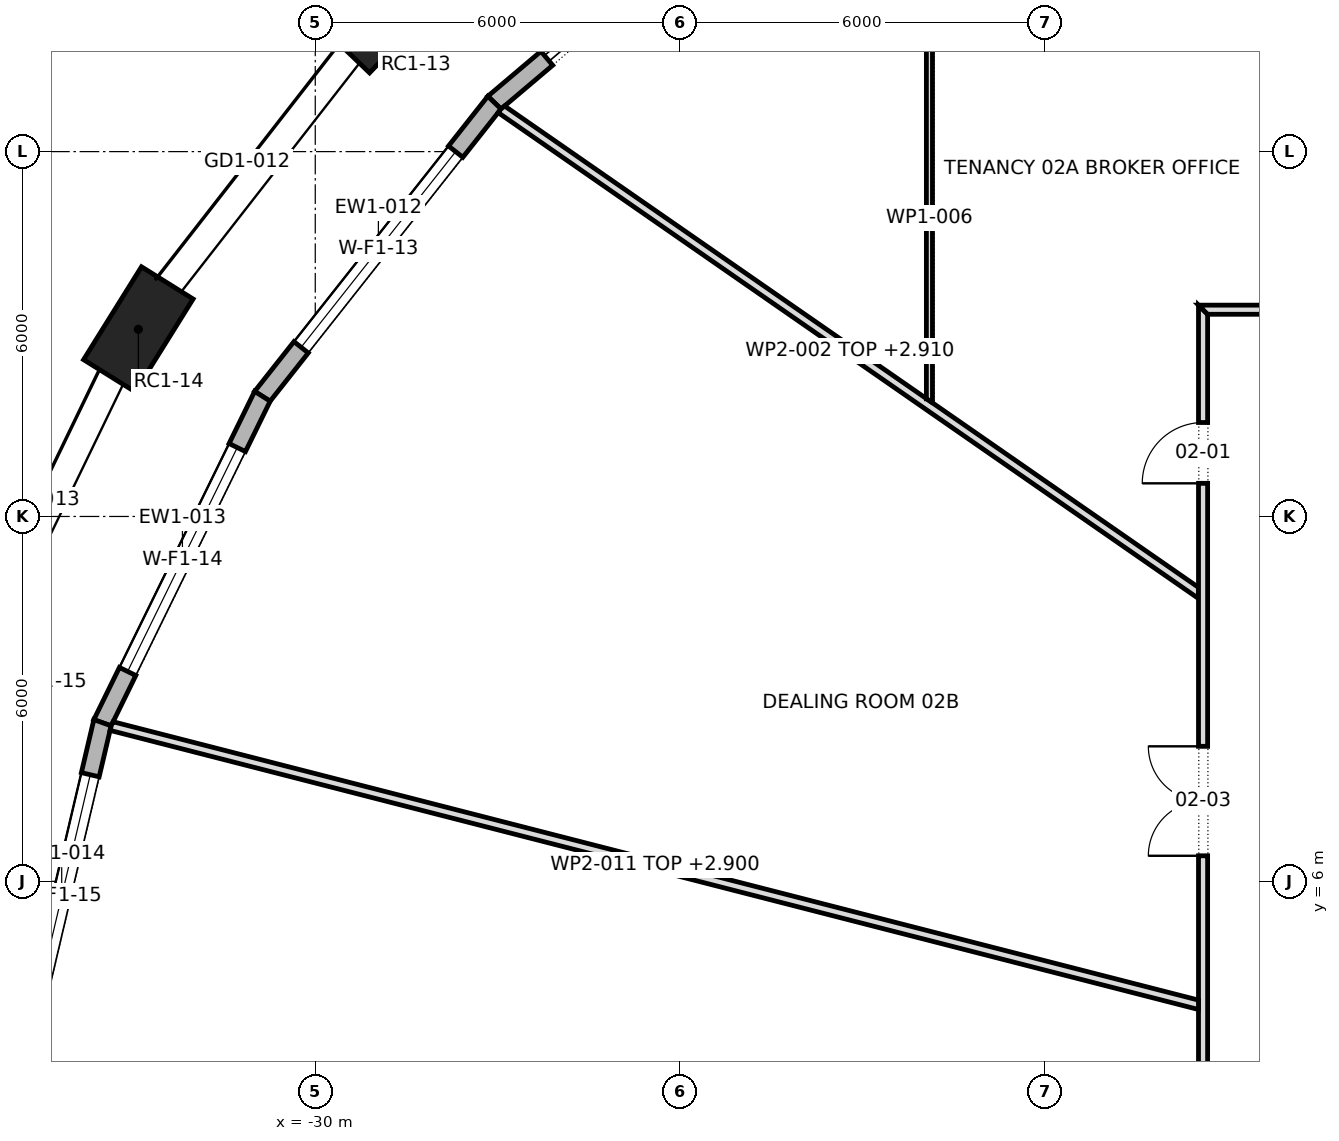
"""IFC4 building model, lengths in metres.
Left out: names, types, materials, properties, quantities, classifications, styles, units other than length and angle.
Written with IfcOpenShell. Run it as: python <this file> out.ifc"""

import sys

from ifc_helpers import new_model, si_unit, direction, frame, frame_2d, origin, origin_2d, place, context, subcontext, project, spatial, polyline, rectangle, outline, extrude, element, fill, save


model = new_model("IFC4")
c1 = context("Model", 3, precision=1e-05, world=origin(), true_north=direction((0.0, 1.0)))
c2 = subcontext(c1, "Body", "Model", "MODEL_VIEW")
j1 = project(units=[si_unit("LENGTHUNIT", "METRE"), si_unit("PLANEANGLEUNIT", "RADIAN")], contexts=[c1])
p1 = place(None, origin())
s1 = spatial("IfcSite", under=j1, at=p1, CompositionType="ELEMENT")
p2 = place(p1, origin())
s2 = spatial("IfcBuilding", under=s1, at=p2, CompositionType="ELEMENT")
p3 = place(p2, frame((0.0, 0.0, 44.5)))
s3 = spatial("IfcBuildingStorey", under=s2, at=p3, CompositionType="ELEMENT", Elevation=44.5)
for number, where, z_axis, x_axis in (
    (1, (-28.845, 20.291, 0.0), (0.0, 0.0, 1.0), (-0.692, -0.722, 0.0)),
    (2, (-32.91, 15.078, 0.0), (0.0, 0.0, 1.0), (-0.529, -0.849, 0.0)),
):
    element("IfcColumn", number, at=place(p3, frame(where, z_axis=z_axis, x_axis=x_axis)), inside=s3, PredefinedType="COLUMN", context=c2, shape_type="SweptSolid", body=[
        extrude(rectangle(XDim=1.8, YDim=1.0, at=origin_2d()), origin(), (0.0, 0.0, 1.0), 4.2),
    ])
p4 = place(p3, frame((-22.2, 22.911, 0.0), z_axis=(0.0, 0.0, 1.0), x_axis=(-0.763577077796, -0.645716691951, 0.0)))
e3 = element("IfcWall", 3, at=p4, inside=s3, PredefinedType="STANDARD", context=c2, shape_type="SweptSolid", body=[
    extrude(outline(polyline([(-0.014, -0.15), (6.372, -0.15), (6.342, 0.15), (0.014, 0.15), (-0.014, -0.15)])), origin(), (0.0, 0.0, 1.0), 3.9),
])
p5 = place(p4, frame((1.129, 0.0, 0.0)))
e4 = element("IfcOpeningElement", 4, at=p5, cuts=e3, PredefinedType="OPENING", context=c2, shape_type="SweptSolid", body=[
    extrude(rectangle(XDim=4.1, YDim=3.45, at=frame_2d((2.05, 1.725))), frame((0.0, 0.162, 0.0), z_axis=(0.0, -1.0, 0.0), x_axis=(1.0, 0.0, 0.0)), (0.0, 0.0, 1.0), 0.324),
])
p6 = place(p3, frame((-27.054, 18.806, 0.0), z_axis=(0.0, 0.0, 1.0), x_axis=(-0.61992334328, -0.784662378642, 0.0)))
e5 = element("IfcWall", 5, at=p6, inside=s3, PredefinedType="STANDARD", context=c2, shape_type="SweptSolid", body=[
    extrude(outline(polyline([(-0.015, -0.15), (6.171, -0.15), (6.139, 0.15), (0.015, 0.15), (-0.015, -0.15)])), origin(), (0.0, 0.0, 1.0), 3.9),
])
p7 = place(p6, frame((1.027, 0.0, 0.6)))
e6 = element("IfcOpeningElement", 6, at=p7, cuts=e5, PredefinedType="OPENING", context=c2, shape_type="SweptSolid", body=[
    extrude(rectangle(XDim=4.1, YDim=2.85, at=frame_2d((2.05, 1.425))), frame((0.0, 0.162, 0.0), z_axis=(0.0, -1.0, 0.0), x_axis=(1.0, 0.0, 0.0)), (0.0, 0.0, 1.0), 0.324),
])
p8 = place(p3, frame((-30.869, 13.976, 0.0), z_axis=(0.0, 0.0, 1.0), x_axis=(-0.439896354052, -0.898048549741, 0.0)))
e7 = element("IfcWall", 7, at=p8, inside=s3, PredefinedType="STANDARD", context=c2, shape_type="SweptSolid", body=[
    extrude(outline(polyline([(-0.016, -0.15), (5.995, -0.15), (5.961, 0.15), (0.016, 0.15), (-0.016, -0.15)])), origin(), (0.0, 0.0, 1.0), 3.9),
])
p9 = place(p8, frame((0.939, 0.0, 0.6)))
e8 = element("IfcOpeningElement", 8, at=p9, cuts=e7, PredefinedType="OPENING", context=c2, shape_type="SweptSolid", body=[
    extrude(rectangle(XDim=4.1, YDim=2.85, at=frame_2d((2.05, 1.425))), frame((0.0, 0.162, 0.0), z_axis=(0.0, -1.0, 0.0), x_axis=(1.0, 0.0, 0.0)), (0.0, 0.0, 1.0), 0.324),
])
p10 = place(p3, frame((-33.499, 8.608, 0.0), z_axis=(0.0, 0.0, 1.0), x_axis=(-0.228976600496, -0.97343192696, 0.0)))
e9 = element("IfcWall", 9, at=p10, inside=s3, PredefinedType="STANDARD", context=c2, shape_type="SweptSolid", body=[
    extrude(outline(polyline([(-0.017, -0.15), (5.874, -0.15), (5.839, 0.15), (0.017, 0.15), (-0.017, -0.15)])), origin(), (0.0, 0.0, 1.0), 3.9),
])
p11 = place(p10, frame((0.878, 0.0, 0.6)))
e10 = element("IfcOpeningElement", 10, at=p11, cuts=e9, PredefinedType="OPENING", context=c2, shape_type="SweptSolid", body=[
    extrude(rectangle(XDim=4.1, YDim=2.85, at=frame_2d((2.05, 1.425))), frame((0.0, 0.162, 0.0), z_axis=(0.0, -1.0, 0.0), x_axis=(1.0, 0.0, 0.0)), (0.0, 0.0, 1.0), 0.324),
])
p12 = place(p3, frame((-26.949, 18.703, 0.0), z_axis=(0.0, 0.0, 1.0), x_axis=(0.821614916445, -0.570042918626, 0.0)))
e11 = element("IfcWall", 11, at=p12, inside=s3, PredefinedType="PARTITIONING", context=c2, shape_type="SweptSolid", body=[
    extrude(outline(polyline([(14.017, -0.075), (14.017, -0.074), (13.967, -0.002), (13.967, -0.002), (13.914, 0.075), (12.1, 0.075), (10.286, 0.075), (8.472, 0.075), (8.469, 0.073), (8.467, 0.075), (6.779, 0.075), (5.09, 0.075), (3.402, 0.075), (1.713, 0.075), (0.024, 0.075), (0.004, 0.0), (0.0, -0.071), (0.0, -0.075), (1.752, -0.075), (3.504, -0.075), (5.257, -0.075), (7.009, -0.075), (8.761, -0.075), (10.513, -0.075), (12.265, -0.075), (14.017, -0.075)])), origin(), (0.0, 0.0, 1.0), 2.91),
])
p13 = place(p3, frame((-19.9, 13.869, 0.0), z_axis=(0.0, 0.0, 1.0), x_axis=(0.0, 1.0, 0.0)))
e12 = element("IfcWall", 12, at=p13, inside=s3, PredefinedType="PARTITIONING", context=c2, shape_type="SweptSolid", body=[
    extrude(outline(polyline([(0.0, -0.05), (1.994, -0.05), (3.987, -0.05), (5.981, -0.05), (5.981, -0.05), (6.081, 0.05), (4.578, 0.05), (3.075, 0.05), (1.572, 0.05), (0.069, 0.05), (0.0, -0.05), (0.0, -0.05)])), origin(), (0.0, 0.0, 1.0), 3.9),
])
p14 = place(p3, frame((-15.4, -15.475, 0.0), z_axis=(0.0, 0.0, 1.0), x_axis=(0.0, 1.0, 0.0)))
e13 = element("IfcWall", 13, at=p14, inside=s3, PredefinedType="PARTITIONING", context=c2, shape_type="SweptSolid", body=[
    extrude(outline(polyline([(0.15, -0.075), (2.066, -0.075), (3.981, -0.075), (5.897, -0.075), (7.812, -0.075), (9.728, -0.075), (11.644, -0.075), (13.56, -0.075), (15.475, -0.075), (17.391, -0.075), (19.306, -0.075), (21.222, -0.075), (23.138, -0.075), (25.053, -0.075), (26.969, -0.075), (28.885, -0.075), (30.8, -0.075), (30.95, 0.075), (29.016, 0.075), (27.081, 0.075), (25.147, 0.075), (23.212, 0.075), (21.278, 0.075), (19.344, 0.075), (17.409, 0.075), (15.475, 0.075), (13.541, 0.075), (11.606, 0.075), (9.672, 0.075), (7.738, 0.075), (5.803, 0.075), (3.869, 0.075), (1.935, 0.075), (0.0, 0.075), (0.15, -0.075)])), origin(), (0.0, 0.0, 1.0), 3.9),
])
p15 = place(p14, frame((28.02, 0.0, 0.0)))
e14 = element("IfcOpeningElement", 14, at=p15, cuts=e13, PredefinedType="OPENING", context=c2, shape_type="SweptSolid", body=[
    extrude(rectangle(XDim=1.0, YDim=2.1, at=frame_2d((0.5, 1.05))), frame((0.0, 0.087, 0.0), z_axis=(0.0, -1.0, 0.0), x_axis=(1.0, 0.0, 0.0)), (0.0, 0.0, 1.0), 0.174),
])
p16 = place(p14, frame((21.895, 0.0, 0.0)))
e15 = element("IfcOpeningElement", 15, at=p16, cuts=e13, PredefinedType="OPENING", context=c2, shape_type="SweptSolid", body=[
    extrude(rectangle(XDim=1.8, YDim=2.1, at=frame_2d((0.9, 1.05))), frame((0.0, 0.087, 0.0), z_axis=(0.0, -1.0, 0.0), x_axis=(1.0, 0.0, 0.0)), (0.0, 0.0, 1.0), 0.174),
])
p17 = place(p14, frame((15.798, 0.0, 0.0)))
e16 = element("IfcOpeningElement", 16, at=p17, cuts=e13, PredefinedType="OPENING", context=c2, shape_type="SweptSolid", body=[
    extrude(rectangle(XDim=1.8, YDim=2.1, at=frame_2d((0.9, 1.05))), frame((0.0, 0.087, 0.0), z_axis=(0.0, -1.0, 0.0), x_axis=(1.0, 0.0, 0.0)), (0.0, 0.0, 1.0), 0.174),
])
p18 = place(p14, frame((10.343, 0.0, 0.0)))
e17 = element("IfcOpeningElement", 17, at=p18, cuts=e13, PredefinedType="OPENING", context=c2, shape_type="SweptSolid", body=[
    extrude(rectangle(XDim=1.8, YDim=2.1, at=frame_2d((0.9, 1.05))), frame((0.0, 0.087, 0.0), z_axis=(0.0, -1.0, 0.0), x_axis=(1.0, 0.0, 0.0)), (0.0, 0.0, 1.0), 0.174),
])
p19 = place(p14, frame((3.795, 0.0, 0.0)))
e18 = element("IfcOpeningElement", 18, at=p19, cuts=e13, PredefinedType="OPENING", context=c2, shape_type="SweptSolid", body=[
    extrude(rectangle(XDim=1.0, YDim=2.1, at=frame_2d((0.5, 1.05))), frame((0.0, 0.087, 0.0), z_axis=(0.0, -1.0, 0.0), x_axis=(1.0, 0.0, 0.0)), (0.0, 0.0, 1.0), 0.174),
])
p20 = place(p3, frame((-15.457, 3.965, 0.0), z_axis=(0.0, 0.0, 1.0), x_axis=(-0.968658160146, 0.248397602209, 0.0)))
e19 = element("IfcWall", 19, at=p20, inside=s3, PredefinedType="PARTITIONING", context=c2, shape_type="SweptSolid", body=[
    extrude(outline(polyline([(0.038, -0.075), (1.881, -0.075), (3.723, -0.075), (5.566, -0.075), (7.409, -0.075), (9.251, -0.075), (11.094, -0.075), (12.937, -0.075), (14.779, -0.075), (16.622, -0.075), (18.465, -0.075), (18.478, -0.012), (18.478, 0.075), (16.63, 0.075), (14.782, 0.075), (12.935, 0.075), (11.087, 0.075), (9.239, 0.075), (7.391, 0.075), (5.543, 0.075), (3.696, 0.075), (1.848, 0.075), (0.0, 0.075), (0.0, 0.073), (0.038, -0.075)])), origin(), (0.0, 0.0, 1.0), 2.9),
])
p21 = place(p3, frame((-15.475, 15.4, 0.0), z_axis=(0.0, 0.0, 1.0), x_axis=(1.0, 0.0, 0.0)))
e20 = element("IfcWall", 20, at=p21, inside=s3, PredefinedType="PARTITIONING", context=c2, shape_type="SweptSolid", body=[
    extrude(outline(polyline([(0.15, -0.075), (2.066, -0.075), (3.981, -0.075), (5.897, -0.075), (7.812, -0.075), (9.728, -0.075), (11.644, -0.075), (13.56, -0.075), (15.475, -0.075), (17.391, -0.075), (19.306, -0.075), (21.222, -0.075), (23.138, -0.075), (25.053, -0.075), (26.969, -0.075), (28.885, -0.075), (30.8, -0.075), (30.95, 0.075), (29.016, 0.075), (27.081, 0.075), (25.147, 0.075), (23.212, 0.075), (21.278, 0.075), (19.344, 0.075), (17.409, 0.075), (15.475, 0.075), (13.541, 0.075), (11.606, 0.075), (9.672, 0.075), (7.738, 0.075), (5.803, 0.075), (3.869, 0.075), (1.935, 0.075), (0.0, 0.075), (0.15, -0.075)])), origin(), (0.0, 0.0, 1.0), 3.9),
])
p22 = place(p21, frame((5.415, 0.0, 0.0)))
e21 = element("IfcOpeningElement", 21, at=p22, cuts=e20, PredefinedType="OPENING", context=c2, shape_type="SweptSolid", body=[
    extrude(rectangle(XDim=1.0, YDim=2.1, at=frame_2d((0.5, 1.05))), frame((0.0, 0.087, 0.0), z_axis=(0.0, -1.0, 0.0), x_axis=(1.0, 0.0, 0.0)), (0.0, 0.0, 1.0), 0.174),
])
p23 = place(p21, frame((25.435, 0.0, 0.0)))
e22 = element("IfcOpeningElement", 22, at=p23, cuts=e20, PredefinedType="OPENING", context=c2, shape_type="SweptSolid", body=[
    extrude(rectangle(XDim=1.0, YDim=2.1, at=frame_2d((0.5, 1.05))), frame((0.0, 0.087, 0.0), z_axis=(0.0, -1.0, 0.0), x_axis=(1.0, 0.0, 0.0)), (0.0, 0.0, 1.0), 0.174),
])
p24 = place(p21, frame((14.975, 0.0, 0.0)))
e23 = element("IfcOpeningElement", 23, at=p24, cuts=e20, PredefinedType="OPENING", context=c2, shape_type="SweptSolid", body=[
    extrude(rectangle(XDim=1.0, YDim=2.1, at=frame_2d((0.5, 1.05))), frame((0.0, 0.087, 0.0), z_axis=(0.0, -1.0, 0.0), x_axis=(1.0, 0.0, 0.0)), (0.0, 0.0, 1.0), 0.174),
])
p25 = place(p5, origin())
e24 = element("IfcDoor", 24, at=p25, inside=s3, OperationType="DOUBLE_DOOR_SLIDING", PredefinedType="DOOR", context=c2, shape_type="SweptSolid", body=[
    extrude(rectangle(XDim=4.1, YDim=3.45, at=frame_2d((2.05, 1.725))), frame((0.0, 0.025, 0.0), z_axis=(0.0, -1.0, 0.0), x_axis=(1.0, 0.0, 0.0)), (0.0, 0.0, 1.0), 0.05),
])
fill(e4, e24)
p26 = place(p7, origin())
e25 = element("IfcWindow", 25, at=p26, inside=s3, PartitioningType="TRIPLE_PANEL_VERTICAL", PredefinedType="WINDOW", context=c2, shape_type="SweptSolid", body=[
    extrude(rectangle(XDim=4.1, YDim=2.85, at=frame_2d((2.05, 1.425))), frame((0.0, 0.03, 0.0), z_axis=(0.0, -1.0, 0.0), x_axis=(1.0, 0.0, 0.0)), (0.0, 0.0, 1.0), 0.06),
])
fill(e6, e25)
p27 = place(p9, origin())
e26 = element("IfcWindow", 26, at=p27, inside=s3, PartitioningType="TRIPLE_PANEL_VERTICAL", PredefinedType="WINDOW", context=c2, shape_type="SweptSolid", body=[
    extrude(rectangle(XDim=4.1, YDim=2.85, at=frame_2d((2.05, 1.425))), frame((0.0, 0.03, 0.0), z_axis=(0.0, -1.0, 0.0), x_axis=(1.0, 0.0, 0.0)), (0.0, 0.0, 1.0), 0.06),
])
fill(e8, e26)
p28 = place(p11, origin())
e27 = element("IfcWindow", 27, at=p28, inside=s3, PartitioningType="TRIPLE_PANEL_VERTICAL", PredefinedType="WINDOW", context=c2, shape_type="SweptSolid", body=[
    extrude(rectangle(XDim=4.1, YDim=2.85, at=frame_2d((2.05, 1.425))), frame((0.0, 0.03, 0.0), z_axis=(0.0, -1.0, 0.0), x_axis=(1.0, 0.0, 0.0)), (0.0, 0.0, 1.0), 0.06),
])
fill(e10, e27)
p29 = place(p15, origin())
e28 = element("IfcDoor", 28, at=p29, inside=s3, OperationType="SINGLE_SWING_RIGHT", PredefinedType="DOOR", context=c2, shape_type="SweptSolid", body=[
    extrude(rectangle(XDim=1.0, YDim=2.1, at=frame_2d((0.5, 1.05))), frame((0.0, 0.025, 0.0), z_axis=(0.0, -1.0, 0.0), x_axis=(1.0, 0.0, 0.0)), (0.0, 0.0, 1.0), 0.05),
])
fill(e14, e28)
p30 = place(p16, origin())
e29 = element("IfcDoor", 29, at=p30, inside=s3, OperationType="DOUBLE_DOOR_SINGLE_SWING", PredefinedType="DOOR", context=c2, shape_type="SweptSolid", body=[
    extrude(rectangle(XDim=1.8, YDim=2.1, at=frame_2d((0.9, 1.05))), frame((0.0, 0.025, 0.0), z_axis=(0.0, -1.0, 0.0), x_axis=(1.0, 0.0, 0.0)), (0.0, 0.0, 1.0), 0.05),
])
fill(e15, e29)
save(model, sys.argv[1])
